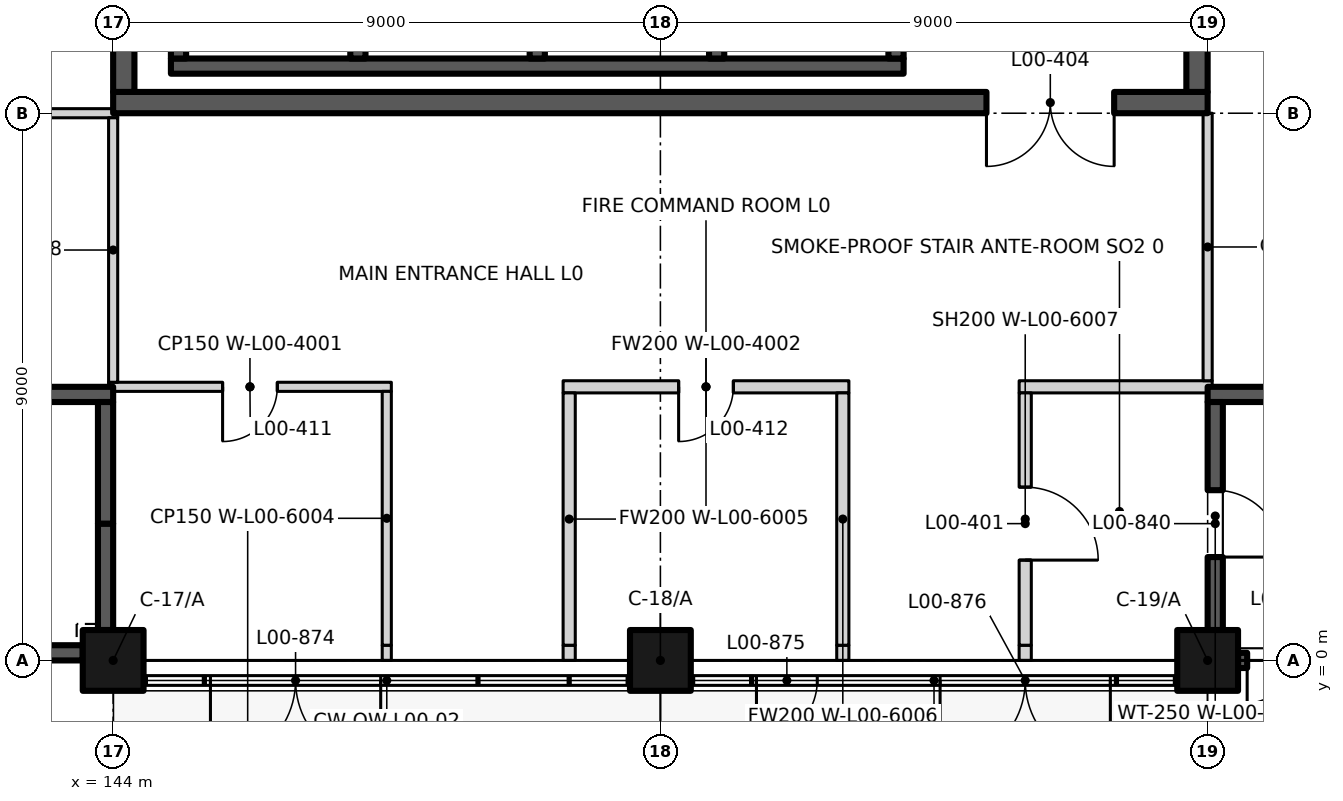
"""IFC4 building model, lengths in metres.
Left out: names, types, materials, properties, quantities, classifications, styles, units other than length and angle.
Written with IfcOpenShell. Run it as: python <this file> out.ifc"""

import sys

from ifc_helpers import new_model, si_unit, direction, frame, frame_2d, origin, origin_2d, place, context, subcontext, project, spatial, rectangle, extrude, element, fill, save


model = new_model("IFC4")
c1 = context("Model", 3, precision=1e-05, world=origin(), true_north=direction((0.0, 1.0)))
c2 = subcontext(c1, "Body", "Model", "MODEL_VIEW")
j1 = project(units=[si_unit("LENGTHUNIT", "METRE"), si_unit("PLANEANGLEUNIT", "RADIAN")], contexts=[c1])
p1 = place(None, origin())
s1 = spatial("IfcSite", under=j1, at=p1, CompositionType="ELEMENT")
p2 = place(p1, origin())
s2 = spatial("IfcBuilding", under=s1, at=p2, CompositionType="ELEMENT")
p3 = place(p2, origin())
s3 = spatial("IfcBuildingStorey", under=s2, at=p3, CompositionType="ELEMENT", Elevation=0.0)
for number, where, z_axis, x_axis in (
    (1, (144.0, 0.0, 0.0), (0.0, 0.0, 1.0), (1.0, 0.0, 0.0)),
    (2, (153.0, 0.0, 0.0), (0.0, 0.0, 1.0), (1.0, 0.0, 0.0)),
    (3, (162.0, 0.0, 0.0), (0.0, 0.0, 1.0), (1.0, 0.0, 0.0)),
):
    element("IfcColumn", number, at=place(p3, frame(where, z_axis=z_axis, x_axis=x_axis)), inside=s3, PredefinedType="COLUMN", context=c2, shape_type="SweptSolid", body=[
        extrude(rectangle(XDim=1.0, YDim=1.0, at=origin_2d()), origin(), (0.0, 0.0, 1.0), 6.0),
    ])
p4 = place(p3, frame((135.5, 0.125, 0.0), z_axis=(0.0, 0.0, 1.0), x_axis=(1.0, 0.0, 0.0)))
e4 = element("IfcWall", 4, at=p4, inside=s3, PredefinedType="SHEAR", context=c2, shape_type="SweptSolid", body=[
    extrude(rectangle(XDim=8.0, YDim=0.25, at=frame_2d((4.0, 0.0))), origin(), (0.0, 0.0, 1.0), 5.1),
])
p5 = place(p4, frame((1.55, 0.0, 0.0), z_axis=(0.0, 0.0, 1.0), x_axis=(-1.0, 0.0, 0.0)))
e5 = element("IfcOpeningElement", 5, at=p5, cuts=e4, PredefinedType="OPENING", context=c2, shape_type="SweptSolid", body=[
    extrude(rectangle(XDim=1.4, YDim=2.1, at=frame_2d((0.7, 1.05))), frame((0.0, 0.135, 0.0), z_axis=(0.0, -1.0, 0.0), x_axis=(1.0, 0.0, 0.0)), (0.0, 0.0, 1.0), 0.27),
])
p6 = place(p3, frame((135.0, 4.375, 0.0), z_axis=(0.0, 0.0, 1.0), x_axis=(1.0, 0.0, 0.0)))
e6 = element("IfcWall", 6, at=p6, inside=s3, PredefinedType="SHEAR", context=c2, shape_type="SweptSolid", body=[
    extrude(rectangle(XDim=9.0, YDim=0.25, at=frame_2d((4.5, 0.0))), origin(), (0.0, 0.0, 1.0), 5.7),
])
p7 = place(p3, frame((143.875, 0.5, 0.0), z_axis=(0.0, 0.0, 1.0), x_axis=(0.0, 1.0, 0.0)))
e7 = element("IfcWall", 7, at=p7, inside=s3, PredefinedType="SHEAR", context=c2, shape_type="SweptSolid", body=[
    extrude(rectangle(XDim=1.75, YDim=0.25, at=frame_2d((0.875, 0.0))), origin(), (0.0, 0.0, 1.0), 5.7),
])
p8 = place(p3, frame((143.875, 2.25, 0.0), z_axis=(0.0, 0.0, 1.0), x_axis=(0.0, 1.0, 0.0)))
e8 = element("IfcWall", 8, at=p8, inside=s3, PredefinedType="SHEAR", context=c2, shape_type="SweptSolid", body=[
    extrude(rectangle(XDim=2.0, YDim=0.25, at=frame_2d((1.0, 0.0))), origin(), (0.0, 0.0, 1.0), 5.7),
])
p9 = place(p3, frame((162.5, 0.0, 0.0), z_axis=(0.0, 0.0, 1.0), x_axis=(1.0, 0.0, 0.0)))
e9 = element("IfcWall", 9, at=p9, inside=s3, PredefinedType="SHEAR", context=c2, shape_type="SweptSolid", body=[
    extrude(rectangle(XDim=8.0, YDim=0.25, at=frame_2d((4.0, 0.0))), origin(), (0.0, 0.0, 1.0), 6.0),
])
p10 = place(p9, frame((1.55, 0.0, 0.0), z_axis=(0.0, 0.0, 1.0), x_axis=(-1.0, 0.0, 0.0)))
e10 = element("IfcOpeningElement", 10, at=p10, cuts=e9, PredefinedType="OPENING", context=c2, shape_type="SweptSolid", body=[
    extrude(rectangle(XDim=1.4, YDim=2.1, at=frame_2d((0.7, 1.05))), frame((0.0, 0.135, 0.0), z_axis=(0.0, -1.0, 0.0), x_axis=(1.0, 0.0, 0.0)), (0.0, 0.0, 1.0), 0.27),
])
p11 = place(p3, frame((162.0, 4.375, 0.0), z_axis=(0.0, 0.0, 1.0), x_axis=(1.0, 0.0, 0.0)))
e11 = element("IfcWall", 11, at=p11, inside=s3, PredefinedType="SHEAR", context=c2, shape_type="SweptSolid", body=[
    extrude(rectangle(XDim=9.0, YDim=0.25, at=frame_2d((4.5, 0.0))), origin(), (0.0, 0.0, 1.0), 6.0),
])
p12 = place(p3, frame((162.125, 0.5, 0.0), z_axis=(0.0, 0.0, 1.0), x_axis=(0.0, 1.0, 0.0)))
e12 = element("IfcWall", 12, at=p12, inside=s3, PredefinedType="SHEAR", context=c2, shape_type="SweptSolid", body=[
    extrude(rectangle(XDim=3.75, YDim=0.25, at=frame_2d((1.875, 0.0))), origin(), (0.0, 0.0, 1.0), 6.0),
])
p13 = place(p12, frame((2.3, 0.0, 0.0), z_axis=(0.0, 0.0, 1.0), x_axis=(-1.0, 0.0, 0.0)))
e13 = element("IfcOpeningElement", 13, at=p13, cuts=e12, PredefinedType="OPENING", context=c2, shape_type="SweptSolid", body=[
    extrude(rectangle(XDim=1.1, YDim=2.1, at=frame_2d((0.55, 1.05))), frame((0.0, 0.135, 0.0), z_axis=(0.0, -1.0, 0.0), x_axis=(1.0, 0.0, 0.0)), (0.0, 0.0, 1.0), 0.27),
])
p14 = place(p3, frame((144.95, 9.775, 0.0), z_axis=(0.0, 0.0, 1.0), x_axis=(1.0, 0.0, 0.0)))
e14 = element("IfcWall", 14, at=p14, inside=s3, PredefinedType="SHEAR", context=c2, shape_type="SweptSolid", body=[
    extrude(rectangle(XDim=12.05, YDim=0.25, at=frame_2d((6.025, 0.0))), origin(), (0.0, 0.0, 1.0), 6.0),
])
for number, where, z_axis, x_axis in (
    (15, (145.075, 9.9, 0.0), (0.0, 0.0, 1.0), (0.0, 1.0, 0.0)),
    (16, (148.025, 9.9, 0.0), (0.0, 0.0, 1.0), (0.0, 1.0, 0.0)),
    (17, (150.975, 9.9, 0.0), (0.0, 0.0, 1.0), (0.0, 1.0, 0.0)),
    (18, (153.925, 9.9, 0.0), (0.0, 0.0, 1.0), (0.0, 1.0, 0.0)),
    (19, (156.875, 9.9, 0.0), (0.0, 0.0, 1.0), (0.0, 1.0, 0.0)),
):
    element("IfcWall", number, at=place(p3, frame(where, z_axis=z_axis, x_axis=x_axis)), inside=s3, PredefinedType="SHEAR", context=c2, shape_type="SweptSolid", body=[
        extrude(rectangle(XDim=2.7, YDim=0.25, at=frame_2d((1.35, 0.0))), origin(), (0.0, 0.0, 1.0), 6.0),
    ])
p15 = place(p3, frame((148.47, -0.33, 0.0), z_axis=(0.0, 0.0, 1.0), x_axis=(-1.0, 0.0, 0.0)))
e20 = element("IfcWall", 20, at=p15, inside=s3, PredefinedType="STANDARD", context=c2, shape_type="SweptSolid", body=[
    extrude(rectangle(XDim=2.94, YDim=0.12, at=frame_2d((1.47, 0.0))), origin(), (0.0, 0.0, 1.0), 2.97),
])
p16 = place(p15, frame((0.07, 0.0, 0.0)))
e21 = element("IfcOpeningElement", 21, at=p16, cuts=e20, PredefinedType="OPENING", context=c2, shape_type="SweptSolid", body=[
    extrude(rectangle(XDim=2.8, YDim=2.4, at=frame_2d((1.4, 1.2))), frame((0.0, 0.07, 0.0), z_axis=(0.0, -1.0, 0.0), x_axis=(1.0, 0.0, 0.0)), (0.0, 0.0, 1.0), 0.14),
])
p17 = place(p3, frame((157.47, -0.33, 0.0), z_axis=(0.0, 0.0, 1.0), x_axis=(-1.0, 0.0, 0.0)))
e22 = element("IfcWall", 22, at=p17, inside=s3, PredefinedType="STANDARD", context=c2, shape_type="SweptSolid", body=[
    extrude(rectangle(XDim=2.94, YDim=0.12, at=frame_2d((1.47, 0.0))), origin(), (0.0, 0.0, 1.0), 2.97),
])
p18 = place(p17, frame((1.89, 0.0, 0.0)))
e23 = element("IfcOpeningElement", 23, at=p18, cuts=e22, PredefinedType="OPENING", context=c2, shape_type="SweptSolid", body=[
    extrude(rectangle(XDim=1.0, YDim=2.1, at=frame_2d((0.5, 1.05))), frame((0.0, 0.07, 0.0), z_axis=(0.0, -1.0, 0.0), x_axis=(1.0, 0.0, 0.0)), (0.0, 0.0, 1.0), 0.14),
])
p19 = place(p3, frame((160.47, -0.33, 0.0), z_axis=(0.0, 0.0, 1.0), x_axis=(-1.0, 0.0, 0.0)))
e24 = element("IfcWall", 24, at=p19, inside=s3, PredefinedType="STANDARD", context=c2, shape_type="SweptSolid", body=[
    extrude(rectangle(XDim=2.94, YDim=0.12, at=frame_2d((1.47, 0.0))), origin(), (0.0, 0.0, 1.0), 2.97),
])
p20 = place(p19, frame((0.07, 0.0, 0.0)))
e25 = element("IfcOpeningElement", 25, at=p20, cuts=e24, PredefinedType="OPENING", context=c2, shape_type="SweptSolid", body=[
    extrude(rectangle(XDim=2.8, YDim=2.4, at=frame_2d((1.4, 1.2))), frame((0.0, 0.07, 0.0), z_axis=(0.0, -1.0, 0.0), x_axis=(1.0, 0.0, 0.0)), (0.0, 0.0, 1.0), 0.14),
])
p21 = place(p3, frame((143.925, 4.5, 0.0), z_axis=(0.0, 0.0, 1.0), x_axis=(1.0, 0.0, 0.0)))
e26 = element("IfcWall", 26, at=p21, inside=s3, PredefinedType="PARTITIONING", context=c2, shape_type="SweptSolid", body=[
    extrude(rectangle(XDim=4.65, YDim=0.15, at=frame_2d((2.325, 0.0))), origin(), (0.0, 0.0, 1.0), 5.7),
])
p22 = place(p21, frame((2.775, 0.0, 0.0), z_axis=(0.0, 0.0, 1.0), x_axis=(-1.0, 0.0, 0.0)))
e27 = element("IfcOpeningElement", 27, at=p22, cuts=e26, PredefinedType="OPENING", context=c2, shape_type="SweptSolid", body=[
    extrude(rectangle(XDim=0.9, YDim=2.1, at=frame_2d((0.45, 1.05))), frame((0.0, 0.085, 0.0), z_axis=(0.0, -1.0, 0.0), x_axis=(1.0, 0.0, 0.0)), (0.0, 0.0, 1.0), 0.17),
])
p23 = place(p3, frame((151.4, 4.5, 0.0), z_axis=(0.0, 0.0, 1.0), x_axis=(1.0, 0.0, 0.0)))
e28 = element("IfcWall", 28, at=p23, inside=s3, PredefinedType="PARTITIONING", context=c2, shape_type="SweptSolid", body=[
    extrude(rectangle(XDim=4.7, YDim=0.2, at=frame_2d((2.35, 0.0))), origin(), (0.0, 0.0, 1.0), 5.7),
])
p24 = place(p23, frame((2.8, 0.0, 0.0), z_axis=(0.0, 0.0, 1.0), x_axis=(-1.0, 0.0, 0.0)))
e29 = element("IfcOpeningElement", 29, at=p24, cuts=e28, PredefinedType="OPENING", context=c2, shape_type="SweptSolid", body=[
    extrude(rectangle(XDim=0.9, YDim=2.1, at=frame_2d((0.45, 1.05))), frame((0.0, 0.11, 0.0), z_axis=(0.0, -1.0, 0.0), x_axis=(1.0, 0.0, 0.0)), (0.0, 0.0, 1.0), 0.22),
])
p25 = place(p3, frame((158.9, 4.5, 0.0), z_axis=(0.0, 0.0, 1.0), x_axis=(1.0, 0.0, 0.0)))
e30 = element("IfcWall", 30, at=p25, inside=s3, PredefinedType="PARTITIONING", context=c2, shape_type="SweptSolid", body=[
    extrude(rectangle(XDim=3.175, YDim=0.2, at=frame_2d((1.587, 0.0))), origin(), (0.0, 0.0, 1.0), 5.7),
])
p26 = place(p3, frame((135.5, 9.0, 0.0), z_axis=(0.0, 0.0, 1.0), x_axis=(1.0, 0.0, 0.0)))
e31 = element("IfcWall", 31, at=p26, inside=s3, PredefinedType="PARTITIONING", context=c2, shape_type="SweptSolid", body=[
    extrude(rectangle(XDim=8.575, YDim=0.15, at=frame_2d((4.288, 0.0))), origin(), (0.0, 0.0, 1.0), 5.7),
])
p27 = place(p26, frame((4.6, 0.0, 0.0), z_axis=(0.0, 0.0, 1.0), x_axis=(-1.0, 0.0, 0.0)))
e32 = element("IfcOpeningElement", 32, at=p27, cuts=e31, PredefinedType="OPENING", context=c2, shape_type="SweptSolid", body=[
    extrude(rectangle(XDim=1.2, YDim=2.1, at=frame_2d((0.6, 1.05))), frame((0.0, 0.085, 0.0), z_axis=(0.0, -1.0, 0.0), x_axis=(1.0, 0.0, 0.0)), (0.0, 0.0, 1.0), 0.17),
])
p28 = place(p3, frame((144.0, 9.175, 0.0), z_axis=(0.0, 0.0, 1.0), x_axis=(1.0, 0.0, 0.0)))
e33 = element("IfcWall", 33, at=p28, inside=s3, PredefinedType="SHEAR", context=c2, shape_type="SweptSolid", body=[
    extrude(rectangle(XDim=18.0, YDim=0.35, at=frame_2d((9.0, 0.0))), origin(), (0.0, 0.0, 1.0), 5.7),
])
p29 = place(p28, frame((16.463, 0.0, 0.0), z_axis=(0.0, 0.0, 1.0), x_axis=(-1.0, 0.0, 0.0)))
e34 = element("IfcOpeningElement", 34, at=p29, cuts=e33, PredefinedType="OPENING", context=c2, shape_type="SweptSolid", body=[
    extrude(rectangle(XDim=2.1, YDim=2.4, at=frame_2d((1.05, 1.2))), frame((0.0, 0.185, 0.0), z_axis=(0.0, -1.0, 0.0), x_axis=(1.0, 0.0, 0.0)), (0.0, 0.0, 1.0), 0.37),
])
p30 = place(p3, frame((144.0, 4.575, 0.0), z_axis=(0.0, 0.0, 1.0), x_axis=(0.0, 1.0, 0.0)))
e35 = element("IfcWall", 35, at=p30, inside=s3, PredefinedType="PARTITIONING", context=c2, shape_type="SweptSolid", body=[
    extrude(rectangle(XDim=4.35, YDim=0.15, at=frame_2d((2.175, 0.0))), origin(), (0.0, 0.0, 1.0), 5.7),
])
p31 = place(p3, frame((144.175, 9.35, 0.0), z_axis=(0.0, 0.0, 1.0), x_axis=(0.0, 1.0, 0.0)))
e36 = element("IfcWall", 36, at=p31, inside=s3, PredefinedType="SHEAR", context=c2, shape_type="SweptSolid", body=[
    extrude(rectangle(XDim=17.4, YDim=0.35, at=frame_2d((8.7, 0.0))), origin(), (0.0, 0.0, 1.0), 5.7),
])
p32 = place(p31, frame((3.75, 0.0, 0.0)))
e37 = element("IfcOpeningElement", 37, at=p32, cuts=e36, PredefinedType="OPENING", context=c2, shape_type="SweptSolid", body=[
    extrude(rectangle(XDim=1.6, YDim=2.4, at=frame_2d((0.8, 1.2))), frame((0.0, 0.185, 0.0), z_axis=(0.0, -1.0, 0.0), x_axis=(1.0, 0.0, 0.0)), (0.0, 0.0, 1.0), 0.37),
])
p33 = place(p3, frame((148.5, 0.0, 0.0), z_axis=(0.0, 0.0, 1.0), x_axis=(0.0, 1.0, 0.0)))
e38 = element("IfcWall", 38, at=p33, inside=s3, PredefinedType="PARTITIONING", context=c2, shape_type="SweptSolid", body=[
    extrude(rectangle(XDim=0.25, YDim=0.15, at=frame_2d((0.125, 0.0))), origin(), (0.0, 0.0, 1.0), 5.1),
])
p34 = place(p3, frame((148.5, 0.25, 0.0), z_axis=(0.0, 0.0, 1.0), x_axis=(0.0, 1.0, 0.0)))
e39 = element("IfcWall", 39, at=p34, inside=s3, PredefinedType="PARTITIONING", context=c2, shape_type="SweptSolid", body=[
    extrude(rectangle(XDim=4.175, YDim=0.15, at=frame_2d((2.087, 0.0))), origin(), (0.0, 0.0, 1.0), 5.7),
])
p35 = place(p3, frame((151.5, 0.0, 0.0), z_axis=(0.0, 0.0, 1.0), x_axis=(0.0, 1.0, 0.0)))
e40 = element("IfcWall", 40, at=p35, inside=s3, PredefinedType="PARTITIONING", context=c2, shape_type="SweptSolid", body=[
    extrude(rectangle(XDim=0.25, YDim=0.2, at=frame_2d((0.125, 0.0))), origin(), (0.0, 0.0, 1.0), 5.1),
])
p36 = place(p3, frame((151.5, 0.25, 0.0), z_axis=(0.0, 0.0, 1.0), x_axis=(0.0, 1.0, 0.0)))
e41 = element("IfcWall", 41, at=p36, inside=s3, PredefinedType="PARTITIONING", context=c2, shape_type="SweptSolid", body=[
    extrude(rectangle(XDim=4.15, YDim=0.2, at=frame_2d((2.075, 0.0))), origin(), (0.0, 0.0, 1.0), 5.7),
])
p37 = place(p3, frame((156.0, 0.0, 0.0), z_axis=(0.0, 0.0, 1.0), x_axis=(0.0, 1.0, 0.0)))
e42 = element("IfcWall", 42, at=p37, inside=s3, PredefinedType="PARTITIONING", context=c2, shape_type="SweptSolid", body=[
    extrude(rectangle(XDim=0.25, YDim=0.2, at=frame_2d((0.125, 0.0))), origin(), (0.0, 0.0, 1.0), 5.1),
])
p38 = place(p3, frame((156.0, 0.25, 0.0), z_axis=(0.0, 0.0, 1.0), x_axis=(0.0, 1.0, 0.0)))
e43 = element("IfcWall", 43, at=p38, inside=s3, PredefinedType="PARTITIONING", context=c2, shape_type="SweptSolid", body=[
    extrude(rectangle(XDim=4.15, YDim=0.2, at=frame_2d((2.075, 0.0))), origin(), (0.0, 0.0, 1.0), 5.7),
])
p39 = place(p3, frame((159.0, 0.0, 0.0), z_axis=(0.0, 0.0, 1.0), x_axis=(0.0, 1.0, 0.0)))
e44 = element("IfcWall", 44, at=p39, inside=s3, PredefinedType="PARTITIONING", context=c2, shape_type="SweptSolid", body=[
    extrude(rectangle(XDim=0.25, YDim=0.2, at=frame_2d((0.125, 0.0))), origin(), (0.0, 0.0, 1.0), 5.1),
])
p40 = place(p3, frame((159.0, 0.25, 0.0), z_axis=(0.0, 0.0, 1.0), x_axis=(0.0, 1.0, 0.0)))
e45 = element("IfcWall", 45, at=p40, inside=s3, PredefinedType="PARTITIONING", context=c2, shape_type="SweptSolid", body=[
    extrude(rectangle(XDim=4.15, YDim=0.2, at=frame_2d((2.075, 0.0))), origin(), (0.0, 0.0, 1.0), 5.7),
])
p41 = place(p40, frame((2.6, 0.0, 0.0), z_axis=(0.0, 0.0, 1.0), x_axis=(-1.0, 0.0, 0.0)))
e46 = element("IfcOpeningElement", 46, at=p41, cuts=e45, PredefinedType="OPENING", context=c2, shape_type="SweptSolid", body=[
    extrude(rectangle(XDim=1.2, YDim=2.1, at=frame_2d((0.6, 1.05))), frame((0.0, 0.11, 0.0), z_axis=(0.0, -1.0, 0.0), x_axis=(1.0, 0.0, 0.0)), (0.0, 0.0, 1.0), 0.22),
])
p42 = place(p3, frame((161.825, 9.35, 0.0), z_axis=(0.0, 0.0, 1.0), x_axis=(0.0, 1.0, 0.0)))
e47 = element("IfcWall", 47, at=p42, inside=s3, PredefinedType="SHEAR", context=c2, shape_type="SweptSolid", body=[
    extrude(rectangle(XDim=17.4, YDim=0.35, at=frame_2d((8.7, 0.0))), origin(), (0.0, 0.0, 1.0), 5.7),
])
p43 = place(p42, frame((7.3, 0.0, 0.0), z_axis=(0.0, 0.0, 1.0), x_axis=(-1.0, 0.0, 0.0)))
e48 = element("IfcOpeningElement", 48, at=p43, cuts=e47, PredefinedType="OPENING", context=c2, shape_type="SweptSolid", body=[
    extrude(rectangle(XDim=1.8, YDim=2.4, at=frame_2d((0.9, 1.2))), frame((0.0, 0.185, 0.0), z_axis=(0.0, -1.0, 0.0), x_axis=(1.0, 0.0, 0.0)), (0.0, 0.0, 1.0), 0.37),
])
p44 = place(p3, frame((162.0, 4.6, 0.0), z_axis=(0.0, 0.0, 1.0), x_axis=(0.0, 1.0, 0.0)))
e49 = element("IfcWall", 49, at=p44, inside=s3, PredefinedType="PARTITIONING", context=c2, shape_type="SweptSolid", body=[
    extrude(rectangle(XDim=4.4, YDim=0.15, at=frame_2d((2.2, 0.0))), origin(), (0.0, 0.0, 1.0), 5.7),
])
p45 = place(p13, origin())
e50 = element("IfcDoor", 50, at=p45, inside=s3, OperationType="SINGLE_SWING_RIGHT", PredefinedType="DOOR", context=c2, shape_type="SweptSolid", body=[
    extrude(rectangle(XDim=1.1, YDim=2.1, at=frame_2d((0.55, 1.05))), frame((0.0, 0.025, 0.0), z_axis=(0.0, -1.0, 0.0), x_axis=(1.0, 0.0, 0.0)), (0.0, 0.0, 1.0), 0.05),
])
fill(e13, e50)
p46 = place(p10, origin())
e51 = element("IfcDoor", 51, at=p46, inside=s3, OperationType="DOUBLE_DOOR_SINGLE_SWING", PredefinedType="DOOR", context=c2, shape_type="SweptSolid", body=[
    extrude(rectangle(XDim=1.4, YDim=2.1, at=frame_2d((0.7, 1.05))), frame((0.0, 0.025, 0.0), z_axis=(0.0, -1.0, 0.0), x_axis=(1.0, 0.0, 0.0)), (0.0, 0.0, 1.0), 0.05),
])
fill(e10, e51)
p47 = place(p16, origin())
e52 = element("IfcDoor", 52, at=p47, inside=s3, OperationType="DOUBLE_DOOR_SINGLE_SWING", PredefinedType="DOOR", context=c2, shape_type="SweptSolid", body=[
    extrude(rectangle(XDim=2.8, YDim=2.4, at=frame_2d((1.4, 1.2))), frame((0.0, 0.025, 0.0), z_axis=(0.0, -1.0, 0.0), x_axis=(1.0, 0.0, 0.0)), (0.0, 0.0, 1.0), 0.05),
])
fill(e21, e52)
p48 = place(p18, origin())
e53 = element("IfcDoor", 53, at=p48, inside=s3, OperationType="SINGLE_SWING_RIGHT", PredefinedType="DOOR", context=c2, shape_type="SweptSolid", body=[
    extrude(rectangle(XDim=1.0, YDim=2.1, at=frame_2d((0.5, 1.05))), frame((0.0, 0.025, 0.0), z_axis=(0.0, -1.0, 0.0), x_axis=(1.0, 0.0, 0.0)), (0.0, 0.0, 1.0), 0.05),
])
fill(e23, e53)
p49 = place(p20, origin())
e54 = element("IfcDoor", 54, at=p49, inside=s3, OperationType="DOUBLE_DOOR_SINGLE_SWING", PredefinedType="DOOR", context=c2, shape_type="SweptSolid", body=[
    extrude(rectangle(XDim=2.8, YDim=2.4, at=frame_2d((1.4, 1.2))), frame((0.0, 0.025, 0.0), z_axis=(0.0, -1.0, 0.0), x_axis=(1.0, 0.0, 0.0)), (0.0, 0.0, 1.0), 0.05),
])
fill(e25, e54)
p50 = place(p41, origin())
e55 = element("IfcDoor", 55, at=p50, inside=s3, OperationType="SINGLE_SWING_RIGHT", PredefinedType="DOOR", context=c2, shape_type="SweptSolid", body=[
    extrude(rectangle(XDim=1.2, YDim=2.1, at=frame_2d((0.6, 1.05))), frame((0.0, 0.025, 0.0), z_axis=(0.0, -1.0, 0.0), x_axis=(1.0, 0.0, 0.0)), (0.0, 0.0, 1.0), 0.05),
])
fill(e46, e55)
p51 = place(p29, origin())
e56 = element("IfcDoor", 56, at=p51, inside=s3, OperationType="DOUBLE_DOOR_SINGLE_SWING", PredefinedType="DOOR", context=c2, shape_type="SweptSolid", body=[
    extrude(rectangle(XDim=2.1, YDim=2.4, at=frame_2d((1.05, 1.2))), frame((0.0, 0.025, 0.0), z_axis=(0.0, -1.0, 0.0), x_axis=(1.0, 0.0, 0.0)), (0.0, 0.0, 1.0), 0.05),
])
fill(e34, e56)
p52 = place(p22, origin())
e57 = element("IfcDoor", 57, at=p52, inside=s3, OperationType="SINGLE_SWING_RIGHT", PredefinedType="DOOR", context=c2, shape_type="SweptSolid", body=[
    extrude(rectangle(XDim=0.9, YDim=2.1, at=frame_2d((0.45, 1.05))), frame((0.0, 0.025, 0.0), z_axis=(0.0, -1.0, 0.0), x_axis=(1.0, 0.0, 0.0)), (0.0, 0.0, 1.0), 0.05),
])
fill(e27, e57)
p53 = place(p24, origin())
e58 = element("IfcDoor", 58, at=p53, inside=s3, OperationType="SINGLE_SWING_RIGHT", PredefinedType="DOOR", context=c2, shape_type="SweptSolid", body=[
    extrude(rectangle(XDim=0.9, YDim=2.1, at=frame_2d((0.45, 1.05))), frame((0.0, 0.025, 0.0), z_axis=(0.0, -1.0, 0.0), x_axis=(1.0, 0.0, 0.0)), (0.0, 0.0, 1.0), 0.05),
])
fill(e29, e58)
save(model, sys.argv[1])
